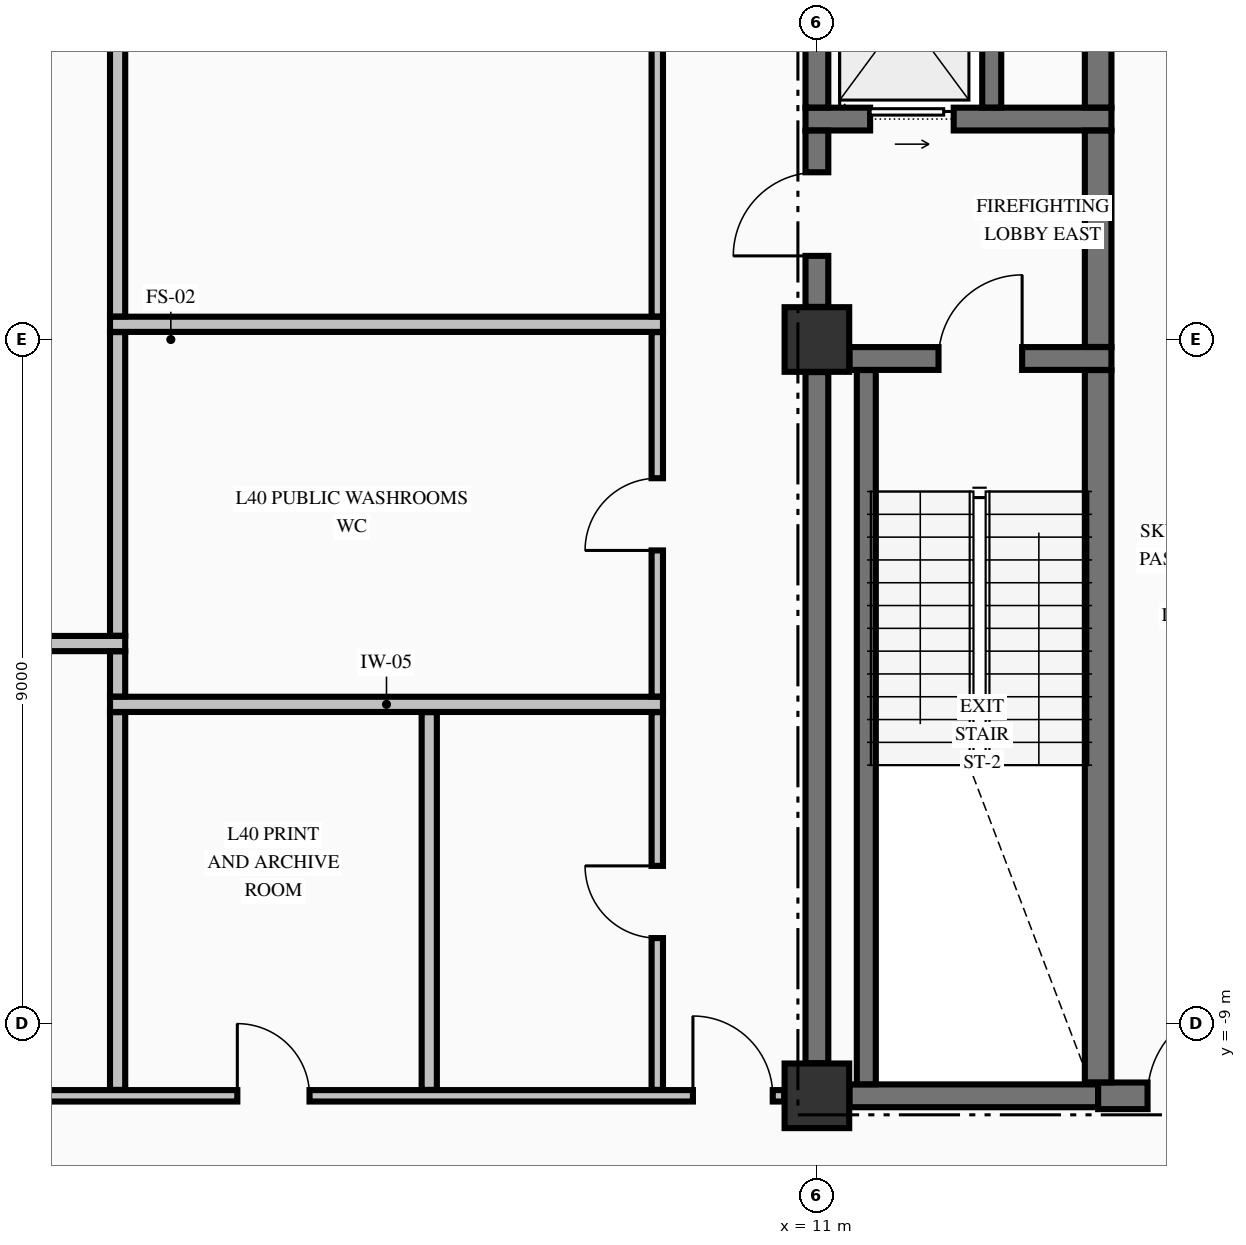
"""IFC4 building model, lengths in metres.
Left out: names, types, materials, properties, quantities, classifications, styles, units other than length and angle.
Written with IfcOpenShell. Run it as: python <this file> out.ifc"""

import sys

from ifc_helpers import new_model, si_unit, direction, frame, frame_2d, origin, origin_2d, place, context, subcontext, project, spatial, rectangle, extrude, element, fill, save


model = new_model("IFC4")
c1 = context("Model", 3, precision=1e-05, world=origin(), true_north=direction((0.0, 1.0)))
c2 = subcontext(c1, "Body", "Model", "MODEL_VIEW")
j1 = project(units=[si_unit("LENGTHUNIT", "METRE"), si_unit("PLANEANGLEUNIT", "RADIAN")], contexts=[c1])
p1 = place(None, origin())
s1 = spatial("IfcSite", under=j1, at=p1, CompositionType="ELEMENT")
p2 = place(p1, origin())
s2 = spatial("IfcBuilding", under=s1, at=p2, CompositionType="ELEMENT")
p3 = place(p2, frame((0.0, 0.0, 158.24)))
s3 = spatial("IfcBuildingStorey", under=s2, at=p3, CompositionType="ELEMENT", Elevation=158.24)
for number, where, z_axis, x_axis in (
    (1, (11.0, -9.95, -0.425), (0.0, 0.0, 1.0), (1.0, 0.0, 0.0)),
    (2, (11.0, 0.0, -0.425), (0.0, 0.0, 1.0), (1.0, 0.0, 0.0)),
):
    element("IfcColumn", number, at=place(p3, frame(where, z_axis=z_axis, x_axis=x_axis)), inside=s3, PredefinedType="COLUMN", context=c2, shape_type="SweptSolid", body=[
        extrude(rectangle(XDim=0.85, YDim=0.85, at=origin_2d()), origin(), (0.0, 0.0, 1.0), 4.595),
    ])
p4 = place(p3, frame((11.429, -9.95, 0.0), z_axis=(0.0, 0.0, 1.0), x_axis=(1.0, 0.0, 0.0)))
e3 = element("IfcWall", 3, at=p4, inside=s3, PredefinedType="SHEAR", context=c2, shape_type="SweptSolid", body=[
    extrude(rectangle(XDim=3.271, YDim=0.3, at=frame_2d((1.635, 0.0))), origin(), (0.0, 0.0, 1.0), 4.17),
])
p5 = place(p3, frame((14.7, -9.95, 0.0), z_axis=(0.0, 0.0, 1.0), x_axis=(1.0, 0.0, 0.0)))
e4 = element("IfcWall", 4, at=p5, inside=s3, PredefinedType="SHEAR", context=c2, shape_type="SweptSolid", body=[
    extrude(rectangle(XDim=4.871, YDim=0.35, at=frame_2d((2.436, 0.0))), origin(), (0.0, 0.0, 1.0), 4.17),
])
p6 = place(p5, frame((0.65, 0.0, 0.0)))
e5 = element("IfcOpeningElement", 5, at=p6, cuts=e4, PredefinedType="OPENING", context=c2, shape_type="SweptSolid", body=[
    extrude(rectangle(XDim=1.2, YDim=2.15, at=frame_2d((0.6, 1.075))), frame((0.0, 0.185, 0.0), z_axis=(0.0, -1.0, 0.0), x_axis=(1.0, 0.0, 0.0)), (0.0, 0.0, 1.0), 0.37),
])
p7 = place(p5, frame((3.25, 0.0, 0.0)))
e6 = element("IfcOpeningElement", 6, at=p7, cuts=e4, PredefinedType="OPENING", context=c2, shape_type="SweptSolid", body=[
    extrude(rectangle(XDim=0.9, YDim=2.15, at=frame_2d((0.45, 1.075))), frame((0.0, 0.185, 0.0), z_axis=(0.0, -1.0, 0.0), x_axis=(1.0, 0.0, 0.0)), (0.0, 0.0, 1.0), 0.37),
])
p8 = place(p3, frame((11.429, -0.25, 0.0), z_axis=(0.0, 0.0, 1.0), x_axis=(1.0, 0.0, 0.0)))
e7 = element("IfcWall", 7, at=p8, inside=s3, PredefinedType="SHEAR", context=c2, shape_type="SweptSolid", body=[
    extrude(rectangle(XDim=3.446, YDim=0.3, at=frame_2d((1.723, 0.0))), origin(), (0.0, 0.0, 1.0), 4.17),
])
p9 = place(p8, frame((1.171, 0.0, 0.0)))
e8 = element("IfcOpeningElement", 8, at=p9, cuts=e7, PredefinedType="OPENING", context=c2, shape_type="SweptSolid", body=[
    extrude(rectangle(XDim=1.1, YDim=2.15, at=frame_2d((0.55, 1.075))), frame((0.0, 0.16, 0.0), z_axis=(0.0, -1.0, 0.0), x_axis=(1.0, 0.0, 0.0)), (0.0, 0.0, 1.0), 0.32),
])
p10 = place(p3, frame((10.85, 2.9, 0.0), z_axis=(0.0, 0.0, 1.0), x_axis=(1.0, 0.0, 0.0)))
e9 = element("IfcWall", 9, at=p10, inside=s3, PredefinedType="SHEAR", context=c2, shape_type="SweptSolid", body=[
    extrude(rectangle(XDim=4.025, YDim=0.3, at=frame_2d((2.012, 0.0))), origin(), (0.0, 0.0, 1.0), 4.17),
])
p11 = place(p10, frame((0.85, 0.0, 0.0)))
e10 = element("IfcOpeningElement", 10, at=p11, cuts=e9, PredefinedType="OPENING", context=c2, shape_type="SweptSolid", body=[
    extrude(rectangle(XDim=1.1, YDim=2.2, at=frame_2d((0.55, 1.1))), frame((0.0, 0.16, 0.0), z_axis=(0.0, -1.0, 0.0), x_axis=(1.0, 0.0, 0.0)), (0.0, 0.0, 1.0), 0.32),
])
p12 = place(p3, frame((-10.569, -9.95, 0.0), z_axis=(0.0, 0.0, 1.0), x_axis=(1.0, 0.0, 0.0)))
e11 = element("IfcWall", 11, at=p12, inside=s3, PredefinedType="PARTITIONING", context=c2, shape_type="SweptSolid", body=[
    extrude(rectangle(XDim=21.138, YDim=0.15, at=frame_2d((10.569, 0.0))), origin(), (0.0, 0.0, 1.0), 4.17),
])
p13 = place(p12, frame((0.15, 0.0, 0.0)))
e12 = element("IfcOpeningElement", 12, at=p13, cuts=e11, PredefinedType="OPENING", context=c2, shape_type="SweptSolid", body=[
    extrude(rectangle(XDim=1.05, YDim=2.15, at=frame_2d((0.525, 1.075))), frame((0.0, 0.085, 0.0), z_axis=(0.0, -1.0, 0.0), x_axis=(1.0, 0.0, 0.0)), (0.0, 0.0, 1.0), 0.17),
])
p14 = place(p12, frame((19.938, 0.0, 0.0)))
e13 = element("IfcOpeningElement", 13, at=p14, cuts=e11, PredefinedType="OPENING", context=c2, shape_type="SweptSolid", body=[
    extrude(rectangle(XDim=1.05, YDim=2.15, at=frame_2d((0.525, 1.075))), frame((0.0, 0.085, 0.0), z_axis=(0.0, -1.0, 0.0), x_axis=(1.0, 0.0, 0.0)), (0.0, 0.0, 1.0), 0.17),
])
p15 = place(p12, frame((13.944, 0.0, 0.0)))
e14 = element("IfcOpeningElement", 14, at=p15, cuts=e11, PredefinedType="OPENING", context=c2, shape_type="SweptSolid", body=[
    extrude(rectangle(XDim=0.95, YDim=2.15, at=frame_2d((0.475, 1.075))), frame((0.0, 0.085, 0.0), z_axis=(0.0, -1.0, 0.0), x_axis=(1.0, 0.0, 0.0)), (0.0, 0.0, 1.0), 0.17),
])
p16 = place(p3, frame((1.7, -4.8, 0.0), z_axis=(0.0, 0.0, 1.0), x_axis=(1.0, 0.0, 0.0)))
e15 = element("IfcWall", 15, at=p16, inside=s3, PredefinedType="PARTITIONING", context=c2, shape_type="SweptSolid", body=[
    extrude(rectangle(XDim=7.275, YDim=0.2, at=frame_2d((3.638, 0.0))), origin(), (0.0, 0.0, 1.0), 4.17),
])
p17 = place(p3, frame((-8.975, -4.0, 0.0), z_axis=(0.0, 0.0, 1.0), x_axis=(1.0, 0.0, 0.0)))
e16 = element("IfcWall", 16, at=p17, inside=s3, PredefinedType="PARTITIONING", context=c2, shape_type="SweptSolid", body=[
    extrude(rectangle(XDim=10.875, YDim=0.2, at=frame_2d((5.438, 0.0))), origin(), (0.0, 0.0, 1.0), 4.17),
])
p18 = place(p3, frame((1.7, 0.2, 0.0), z_axis=(0.0, 0.0, 1.0), x_axis=(1.0, 0.0, 0.0)))
e17 = element("IfcWall", 17, at=p18, inside=s3, PredefinedType="PARTITIONING", context=c2, shape_type="SweptSolid", body=[
    extrude(rectangle(XDim=7.275, YDim=0.2, at=frame_2d((3.638, 0.0))), origin(), (0.0, 0.0, 1.0), 4.17),
])
p19 = place(p3, frame((11.0, -9.521, 0.0), z_axis=(0.0, 0.0, 1.0), x_axis=(0.0, 1.0, 0.0)))
e18 = element("IfcWall", 18, at=p19, inside=s3, PredefinedType="SHEAR", context=c2, shape_type="SweptSolid", body=[
    extrude(rectangle(XDim=9.092, YDim=0.3, at=frame_2d((4.546, 0.0))), origin(), (0.0, 0.0, 1.0), 4.17),
])
p20 = place(p3, frame((11.0, 0.429, 0.0), z_axis=(0.0, 0.0, 1.0), x_axis=(0.0, 1.0, 0.0)))
e19 = element("IfcWall", 19, at=p20, inside=s3, PredefinedType="SHEAR", context=c2, shape_type="SweptSolid", body=[
    extrude(rectangle(XDim=2.319, YDim=0.3, at=frame_2d((1.16, 0.0))), origin(), (0.0, 0.0, 1.0), 4.17),
])
p21 = place(p20, frame((0.671, 0.0, 0.0)))
e20 = element("IfcOpeningElement", 20, at=p21, cuts=e19, PredefinedType="OPENING", context=c2, shape_type="SweptSolid", body=[
    extrude(rectangle(XDim=1.1, YDim=2.15, at=frame_2d((0.55, 1.075))), frame((0.0, 0.16, 0.0), z_axis=(0.0, -1.0, 0.0), x_axis=(1.0, 0.0, 0.0)), (0.0, 0.0, 1.0), 0.32),
])
p22 = place(p3, frame((11.0, 3.052, 0.0), z_axis=(0.0, 0.0, 1.0), x_axis=(0.0, 1.0, 0.0)))
e21 = element("IfcWall", 21, at=p22, inside=s3, PredefinedType="SHEAR", context=c2, shape_type="SweptSolid", body=[
    extrude(rectangle(XDim=2.496, YDim=0.3, at=frame_2d((1.248, 0.0))), origin(), (0.0, 0.0, 1.0), 4.17),
])
p23 = place(p3, frame((11.65, -9.798, 0.0), z_axis=(0.0, 0.0, 1.0), x_axis=(0.0, 1.0, 0.0)))
e22 = element("IfcWall", 22, at=p23, inside=s3, PredefinedType="SOLIDWALL", context=c2, shape_type="SweptSolid", body=[
    extrude(rectangle(XDim=9.396, YDim=0.25, at=frame_2d((4.698, 0.0))), origin(), (0.0, 0.0, 1.0), 4.17),
])
p24 = place(p3, frame((13.3, 3.052, 0.0), z_axis=(0.0, 0.0, 1.0), x_axis=(0.0, 1.0, 0.0)))
e23 = element("IfcWall", 23, at=p24, inside=s3, PredefinedType="SOLIDWALL", context=c2, shape_type="SweptSolid", body=[
    extrude(rectangle(XDim=2.496, YDim=0.25, at=frame_2d((1.248, 0.0))), origin(), (0.0, 0.0, 1.0), 4.17),
])
p25 = place(p3, frame((14.7, -9.773, 0.0), z_axis=(0.0, 0.0, 1.0), x_axis=(0.0, 1.0, 0.0)))
e24 = element("IfcWall", 24, at=p25, inside=s3, PredefinedType="SHEAR", context=c2, shape_type="SweptSolid", body=[
    extrude(rectangle(XDim=9.371, YDim=0.35, at=frame_2d((4.686, 0.0))), origin(), (0.0, 0.0, 1.0), 4.17),
])
p26 = place(p3, frame((14.7, -0.098, 0.0), z_axis=(0.0, 0.0, 1.0), x_axis=(0.0, 1.0, 0.0)))
e25 = element("IfcWall", 25, at=p26, inside=s3, PredefinedType="SHEAR", context=c2, shape_type="SweptSolid", body=[
    extrude(rectangle(XDim=2.846, YDim=0.35, at=frame_2d((1.423, 0.0))), origin(), (0.0, 0.0, 1.0), 4.17),
])
p27 = place(p3, frame((14.7, 3.052, 0.0), z_axis=(0.0, 0.0, 1.0), x_axis=(0.0, 1.0, 0.0)))
e26 = element("IfcWall", 26, at=p27, inside=s3, PredefinedType="SHEAR", context=c2, shape_type="SweptSolid", body=[
    extrude(rectangle(XDim=2.496, YDim=0.35, at=frame_2d((1.248, 0.0))), origin(), (0.0, 0.0, 1.0), 4.17),
])
p28 = place(p3, frame((1.8, -9.872, 0.0), z_axis=(0.0, 0.0, 1.0), x_axis=(0.0, 1.0, 0.0)))
e27 = element("IfcWall", 27, at=p28, inside=s3, PredefinedType="PARTITIONING", context=c2, shape_type="SweptSolid", body=[
    extrude(rectangle(XDim=4.969, YDim=0.2, at=frame_2d((2.484, 0.0))), origin(), (0.0, 0.0, 1.0), 4.17),
])
p29 = place(p3, frame((1.8, -4.697, 0.0), z_axis=(0.0, 0.0, 1.0), x_axis=(0.0, 1.0, 0.0)))
e28 = element("IfcWall", 28, at=p29, inside=s3, PredefinedType="PARTITIONING", context=c2, shape_type="SweptSolid", body=[
    extrude(rectangle(XDim=0.594, YDim=0.2, at=frame_2d((0.297, 0.0))), origin(), (0.0, 0.0, 1.0), 4.17),
])
p30 = place(p3, frame((1.8, -3.897, 0.0), z_axis=(0.0, 0.0, 1.0), x_axis=(0.0, 1.0, 0.0)))
e29 = element("IfcWall", 29, at=p30, inside=s3, PredefinedType="PARTITIONING", context=c2, shape_type="SweptSolid", body=[
    extrude(rectangle(XDim=3.994, YDim=0.2, at=frame_2d((1.997, 0.0))), origin(), (0.0, 0.0, 1.0), 4.17),
])
p31 = place(p3, frame((1.8, 0.303, 0.0), z_axis=(0.0, 0.0, 1.0), x_axis=(0.0, 1.0, 0.0)))
e30 = element("IfcWall", 30, at=p31, inside=s3, PredefinedType="PARTITIONING", context=c2, shape_type="SweptSolid", body=[
    extrude(rectangle(XDim=10.119, YDim=0.2, at=frame_2d((5.06, 0.0))), origin(), (0.0, 0.0, 1.0), 4.17),
])
p32 = place(p3, frame((5.9, -9.872, 0.0), z_axis=(0.0, 0.0, 1.0), x_axis=(0.0, 1.0, 0.0)))
e31 = element("IfcWall", 31, at=p32, inside=s3, PredefinedType="PARTITIONING", context=c2, shape_type="SweptSolid", body=[
    extrude(rectangle(XDim=4.969, YDim=0.2, at=frame_2d((2.484, 0.0))), origin(), (0.0, 0.0, 1.0), 4.17),
])
p33 = place(p3, frame((8.9, -9.872, 0.0), z_axis=(0.0, 0.0, 1.0), x_axis=(0.0, 1.0, 0.0)))
e32 = element("IfcWall", 32, at=p33, inside=s3, PredefinedType="PARTITIONING", context=c2, shape_type="SweptSolid", body=[
    extrude(rectangle(XDim=4.969, YDim=0.15, at=frame_2d((2.484, 0.0))), origin(), (0.0, 0.0, 1.0), 4.17),
])
p34 = place(p33, frame((1.997, 0.0, 0.0)))
e33 = element("IfcOpeningElement", 33, at=p34, cuts=e32, PredefinedType="OPENING", context=c2, shape_type="SweptSolid", body=[
    extrude(rectangle(XDim=0.95, YDim=2.15, at=frame_2d((0.475, 1.075))), frame((0.0, 0.085, 0.0), z_axis=(0.0, -1.0, 0.0), x_axis=(1.0, 0.0, 0.0)), (0.0, 0.0, 1.0), 0.17),
])
p35 = place(p3, frame((8.9, -4.697, 0.0), z_axis=(0.0, 0.0, 1.0), x_axis=(0.0, 1.0, 0.0)))
e34 = element("IfcWall", 34, at=p35, inside=s3, PredefinedType="PARTITIONING", context=c2, shape_type="SweptSolid", body=[
    extrude(rectangle(XDim=4.794, YDim=0.15, at=frame_2d((2.397, 0.0))), origin(), (0.0, 0.0, 1.0), 4.17),
])
p36 = place(p35, frame((1.922, 0.0, 0.0)))
e35 = element("IfcOpeningElement", 35, at=p36, cuts=e34, PredefinedType="OPENING", context=c2, shape_type="SweptSolid", body=[
    extrude(rectangle(XDim=0.95, YDim=2.15, at=frame_2d((0.475, 1.075))), frame((0.0, 0.085, 0.0), z_axis=(0.0, -1.0, 0.0), x_axis=(1.0, 0.0, 0.0)), (0.0, 0.0, 1.0), 0.17),
])
p37 = place(p3, frame((8.9, 0.303, 0.0), z_axis=(0.0, 0.0, 1.0), x_axis=(0.0, 1.0, 0.0)))
e36 = element("IfcWall", 36, at=p37, inside=s3, PredefinedType="PARTITIONING", context=c2, shape_type="SweptSolid", body=[
    extrude(rectangle(XDim=10.119, YDim=0.15, at=frame_2d((5.06, 0.0))), origin(), (0.0, 0.0, 1.0), 4.17),
])
p38 = place(p37, frame((4.497, 0.0, 0.0)))
e37 = element("IfcOpeningElement", 37, at=p38, cuts=e36, PredefinedType="OPENING", context=c2, shape_type="SweptSolid", body=[
    extrude(rectangle(XDim=1.1, YDim=2.15, at=frame_2d((0.55, 1.075))), frame((0.0, 0.085, 0.0), z_axis=(0.0, -1.0, 0.0), x_axis=(1.0, 0.0, 0.0)), (0.0, 0.0, 1.0), 0.17),
])
p39 = place(p9, origin())
e38 = element("IfcDoor", 38, at=p39, inside=s3, OperationType="SINGLE_SWING_RIGHT", PredefinedType="DOOR", context=c2, shape_type="SweptSolid", body=[
    extrude(rectangle(XDim=1.1, YDim=2.15, at=frame_2d((0.55, 1.075))), frame((0.0, 0.025, 0.0), z_axis=(0.0, -1.0, 0.0), x_axis=(1.0, 0.0, 0.0)), (0.0, 0.0, 1.0), 0.05),
])
fill(e8, e38)
p40 = place(p21, origin())
e39 = element("IfcDoor", 39, at=p40, inside=s3, OperationType="SINGLE_SWING_LEFT", PredefinedType="DOOR", context=c2, shape_type="SweptSolid", body=[
    extrude(rectangle(XDim=1.1, YDim=2.15, at=frame_2d((0.55, 1.075))), frame((0.0, 0.025, 0.0), z_axis=(0.0, -1.0, 0.0), x_axis=(1.0, 0.0, 0.0)), (0.0, 0.0, 1.0), 0.05),
])
fill(e20, e39)
p41 = place(p11, origin())
e40 = element("IfcDoor", 40, at=p41, inside=s3, OperationType="SLIDING_TO_RIGHT", PredefinedType="DOOR", context=c2, shape_type="SweptSolid", body=[
    extrude(rectangle(XDim=1.1, YDim=2.2, at=frame_2d((0.55, 1.1))), frame((0.0, 0.025, 0.0), z_axis=(0.0, -1.0, 0.0), x_axis=(1.0, 0.0, 0.0)), (0.0, 0.0, 1.0), 0.05),
])
fill(e10, e40)
p42 = place(p6, origin())
e41 = element("IfcDoor", 41, at=p42, inside=s3, OperationType="SINGLE_SWING_RIGHT", PredefinedType="DOOR", context=c2, shape_type="SweptSolid", body=[
    extrude(rectangle(XDim=1.2, YDim=2.15, at=frame_2d((0.6, 1.075))), frame((0.0, 0.025, 0.0), z_axis=(0.0, -1.0, 0.0), x_axis=(1.0, 0.0, 0.0)), (0.0, 0.0, 1.0), 0.05),
])
fill(e5, e41)
p43 = place(p14, origin())
e42 = element("IfcDoor", 42, at=p43, inside=s3, OperationType="SINGLE_SWING_LEFT", PredefinedType="DOOR", context=c2, shape_type="SweptSolid", body=[
    extrude(rectangle(XDim=1.05, YDim=2.15, at=frame_2d((0.525, 1.075))), frame((0.0, 0.025, 0.0), z_axis=(0.0, -1.0, 0.0), x_axis=(1.0, 0.0, 0.0)), (0.0, 0.0, 1.0), 0.05),
])
fill(e13, e42)
p44 = place(p36, origin())
e43 = element("IfcDoor", 43, at=p44, inside=s3, OperationType="SINGLE_SWING_LEFT", PredefinedType="DOOR", context=c2, shape_type="SweptSolid", body=[
    extrude(rectangle(XDim=0.95, YDim=2.15, at=frame_2d((0.475, 1.075))), frame((0.0, 0.025, 0.0), z_axis=(0.0, -1.0, 0.0), x_axis=(1.0, 0.0, 0.0)), (0.0, 0.0, 1.0), 0.05),
])
fill(e35, e43)
p45 = place(p34, origin())
e44 = element("IfcDoor", 44, at=p45, inside=s3, OperationType="SINGLE_SWING_RIGHT", PredefinedType="DOOR", context=c2, shape_type="SweptSolid", body=[
    extrude(rectangle(XDim=0.95, YDim=2.15, at=frame_2d((0.475, 1.075))), frame((0.0, 0.025, 0.0), z_axis=(0.0, -1.0, 0.0), x_axis=(1.0, 0.0, 0.0)), (0.0, 0.0, 1.0), 0.05),
])
fill(e33, e44)
p46 = place(p15, origin())
e45 = element("IfcDoor", 45, at=p46, inside=s3, OperationType="SINGLE_SWING_LEFT", PredefinedType="DOOR", context=c2, shape_type="SweptSolid", body=[
    extrude(rectangle(XDim=0.95, YDim=2.15, at=frame_2d((0.475, 1.075))), frame((0.0, 0.025, 0.0), z_axis=(0.0, -1.0, 0.0), x_axis=(1.0, 0.0, 0.0)), (0.0, 0.0, 1.0), 0.05),
])
fill(e14, e45)
save(model, sys.argv[1])
